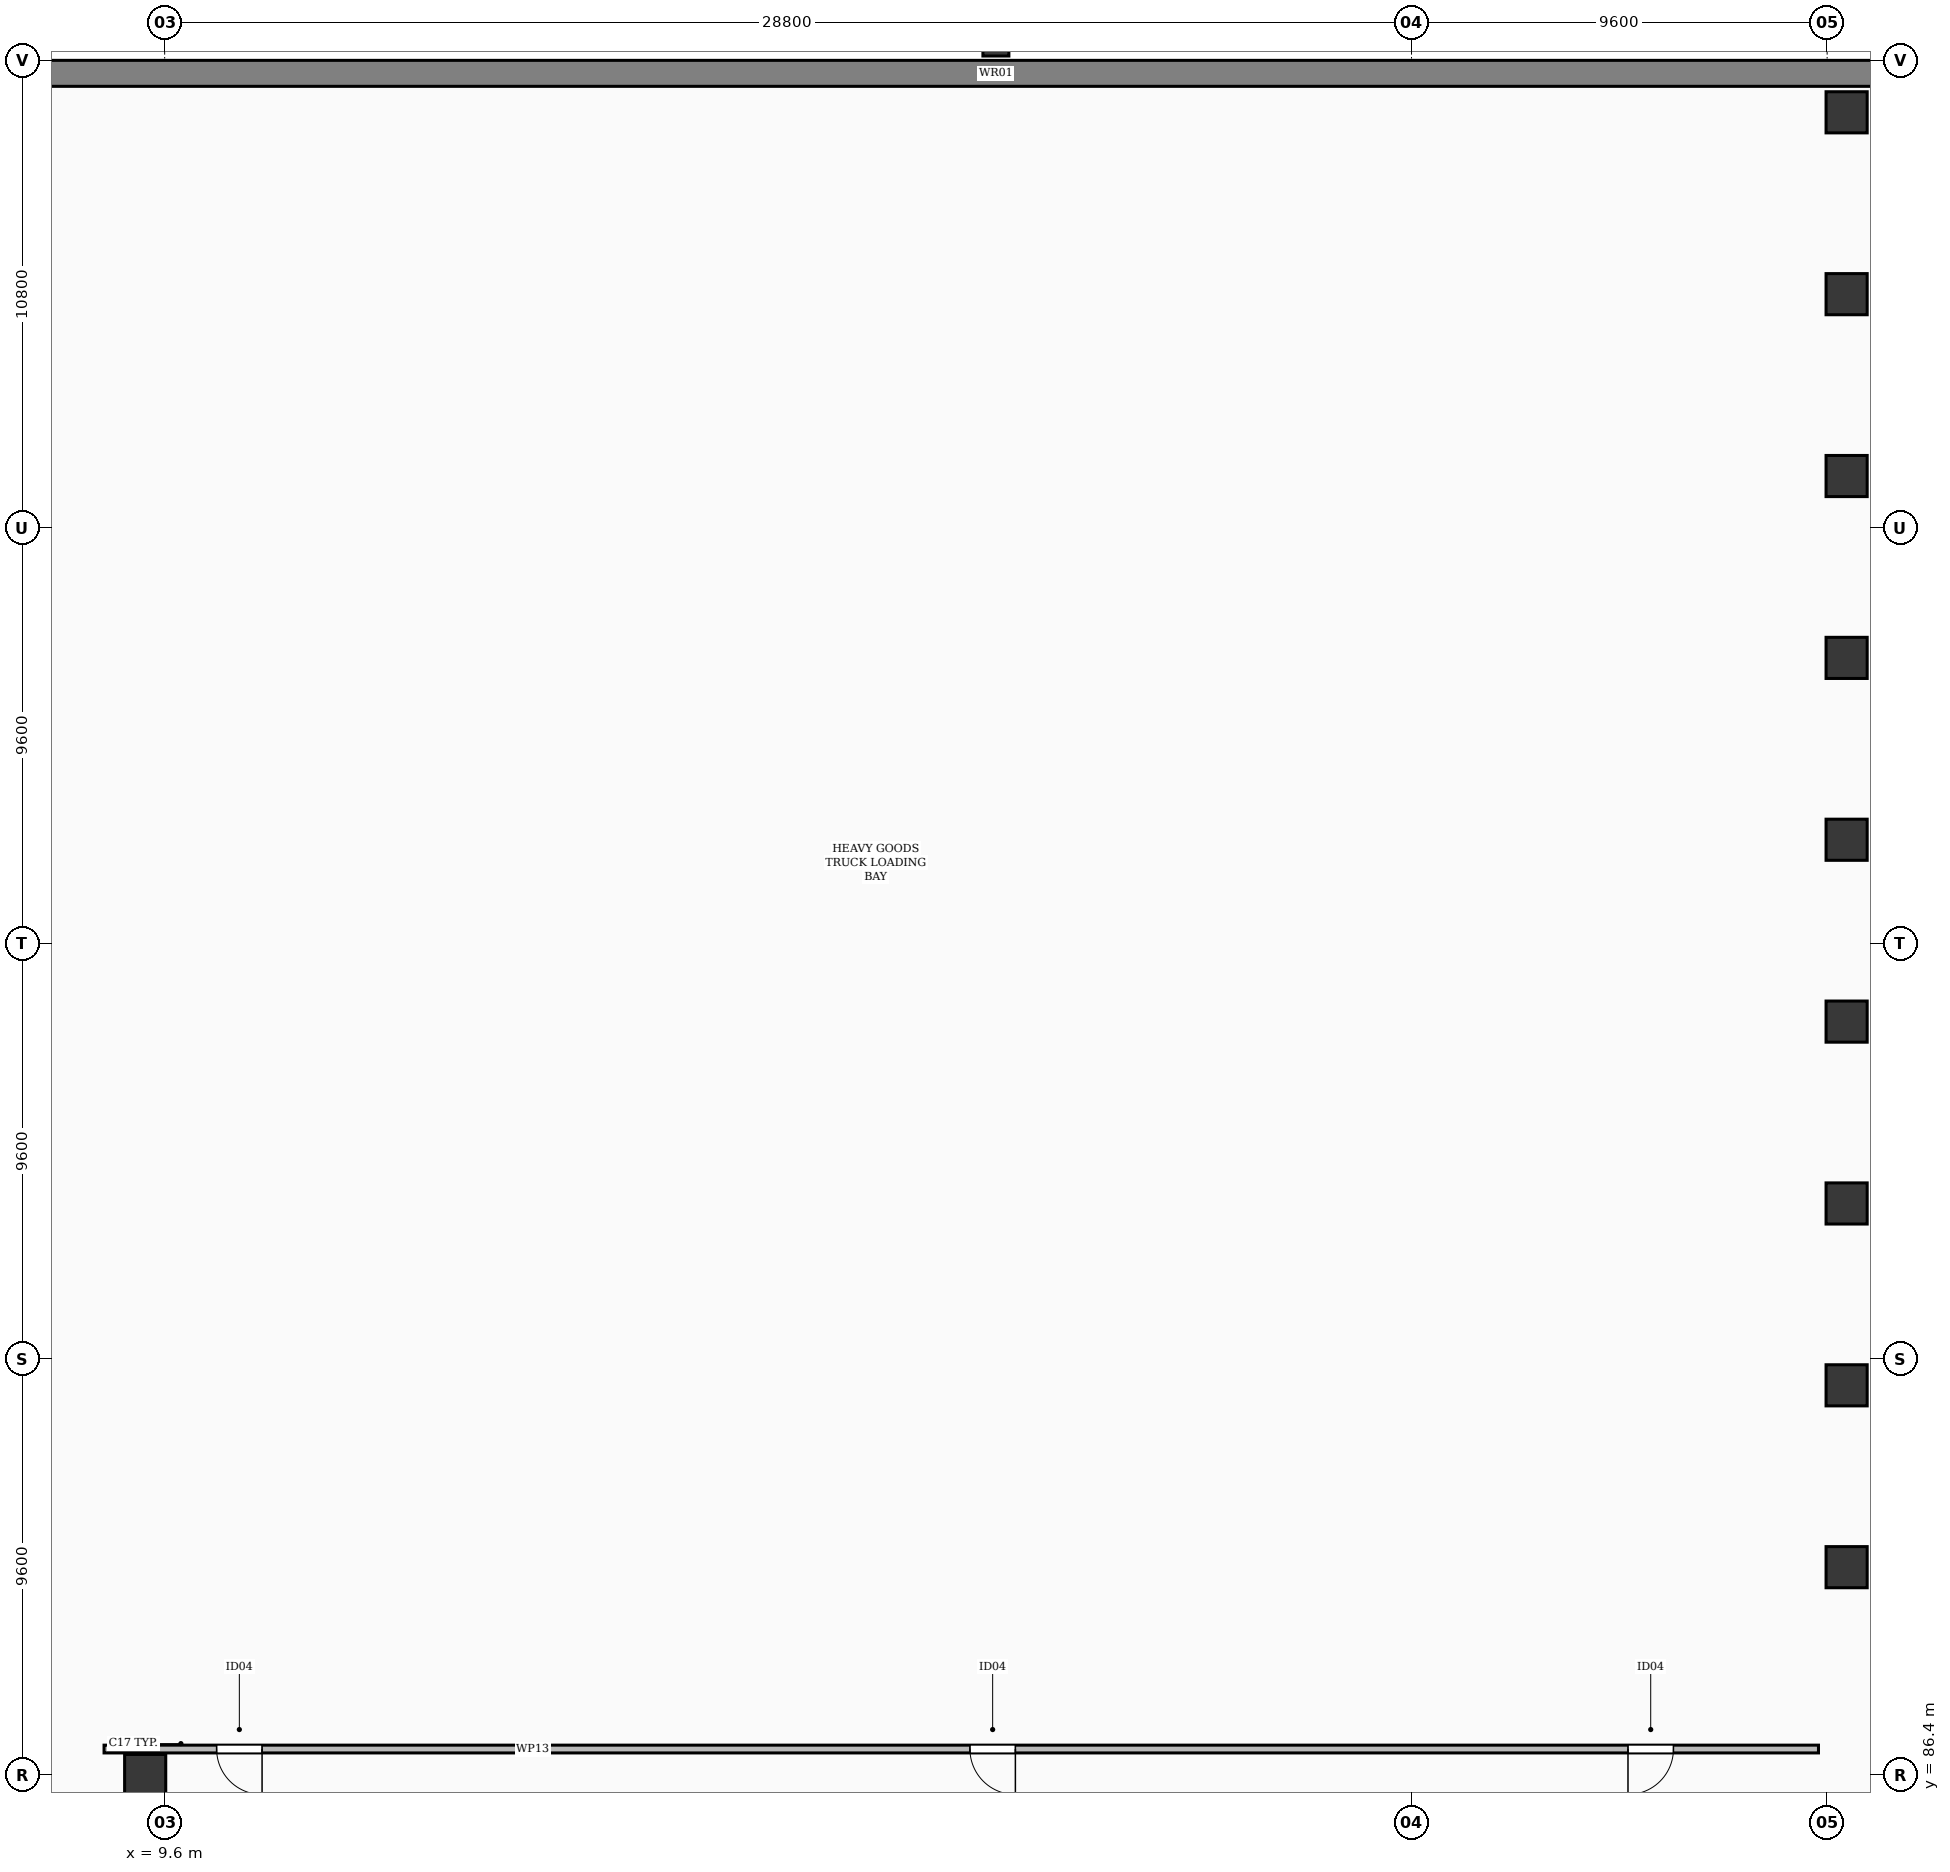
"""IFC4 building model, lengths in metres.
Left out: names, types, materials, properties, quantities, classifications, styles, units other than length and angle.
Written with IfcOpenShell. Run it as: python <this file> out.ifc"""

import sys

from ifc_helpers import new_model, si_unit, direction, frame, frame_2d, origin, origin_2d, place, context, subcontext, project, spatial, rectangle, extrude, element, fill, save


model = new_model("IFC4")
c1 = context("Model", 3, precision=1e-05, world=origin(), true_north=direction((0.0, 1.0)))
c2 = subcontext(c1, "Body", "Model", "MODEL_VIEW")
j1 = project(units=[si_unit("LENGTHUNIT", "METRE"), si_unit("PLANEANGLEUNIT", "RADIAN")], contexts=[c1])
p1 = place(None, origin())
s1 = spatial("IfcSite", under=j1, at=p1, CompositionType="ELEMENT")
p2 = place(p1, origin())
s2 = spatial("IfcBuilding", under=s1, at=p2, CompositionType="ELEMENT")
p3 = place(p2, frame((0.0, 0.0, -4.2)))
s3 = spatial("IfcBuildingStorey", under=s2, at=p3, CompositionType="ELEMENT", Elevation=-4.2)
for number, where, z_axis, x_axis in (
    (1, (9.15, 86.4, 0.0), (0.0, 0.0, 1.0), (1.0, 0.0, 0.0)),
    (2, (48.45, 91.2, 0.0), (0.0, 0.0, 1.0), (1.0, 0.0, 0.0)),
    (3, (48.45, 95.4, 0.0), (0.0, 0.0, 1.0), (1.0, 0.0, 0.0)),
    (4, (48.45, 99.6, 0.0), (0.0, 0.0, 1.0), (1.0, 0.0, 0.0)),
    (5, (48.45, 103.8, 0.0), (0.0, 0.0, 1.0), (1.0, 0.0, 0.0)),
    (6, (48.45, 108.0, 0.0), (0.0, 0.0, 1.0), (1.0, 0.0, 0.0)),
    (7, (48.45, 112.2, 0.0), (0.0, 0.0, 1.0), (1.0, 0.0, 0.0)),
    (8, (48.45, 116.4, 0.0), (0.0, 0.0, 1.0), (1.0, 0.0, 0.0)),
    (9, (48.45, 120.6, 0.0), (0.0, 0.0, 1.0), (1.0, 0.0, 0.0)),
    (10, (48.45, 124.8, 0.0), (0.0, 0.0, 1.0), (1.0, 0.0, 0.0)),
):
    element("IfcColumn", number, at=place(p3, frame(where, z_axis=z_axis, x_axis=x_axis)), inside=s3, PredefinedType="COLUMN", context=c2, shape_type="SweptSolid", body=[
        extrude(rectangle(XDim=0.95, YDim=0.95, at=origin_2d()), origin(), (0.0, 0.0, 1.0), 4.2),
    ])
p4 = place(p3, frame((28.8, 126.4, 0.0), z_axis=(0.0, 0.0, 1.0), x_axis=(1.0, 0.0, 0.0)))
e11 = element("IfcColumn", 11, at=p4, inside=s3, PredefinedType="COLUMN", context=c2, shape_type="SweptSolid", body=[
    extrude(rectangle(XDim=0.6, YDim=0.6, at=origin_2d()), origin(), (0.0, 0.0, 1.0), 4.2),
])
p5 = place(p3, frame((0.6, 125.7, 0.0), z_axis=(0.0, 0.0, 1.0), x_axis=(1.0, 0.0, 0.0)))
e12 = element("IfcWall", 12, at=p5, inside=s3, PredefinedType="USERDEFINED", context=c2, shape_type="SweptSolid", body=[
    extrude(rectangle(XDim=56.4, YDim=0.6, at=frame_2d((28.2, 0.0))), origin(), (0.0, 0.0, 1.0), 3.78),
])
p6 = place(p3, frame((8.2, 87.0, 0.0), z_axis=(0.0, 0.0, 1.0), x_axis=(1.0, 0.0, 0.0)))
e13 = element("IfcWall", 13, at=p6, inside=s3, PredefinedType="PARTITIONING", context=c2, shape_type="SweptSolid", body=[
    extrude(rectangle(XDim=39.6, YDim=0.18, at=frame_2d((19.8, 0.0))), origin(), (0.0, 0.0, 1.0), 3.78),
])
p7 = place(p6, frame((2.6, 0.0, 0.0)))
e14 = element("IfcOpeningElement", 14, at=p7, cuts=e13, PredefinedType="OPENING", context=c2, shape_type="SweptSolid", body=[
    extrude(rectangle(XDim=1.05, YDim=2.18, at=frame_2d((0.525, 1.09))), frame((0.0, 0.102, 0.0), z_axis=(0.0, -1.0, 0.0), x_axis=(1.0, 0.0, 0.0)), (0.0, 0.0, 1.0), 0.204),
])
p8 = place(p6, frame((35.2, 0.0, 0.0)))
e15 = element("IfcOpeningElement", 15, at=p8, cuts=e13, PredefinedType="OPENING", context=c2, shape_type="SweptSolid", body=[
    extrude(rectangle(XDim=1.05, YDim=2.18, at=frame_2d((0.525, 1.09))), frame((0.0, 0.102, 0.0), z_axis=(0.0, -1.0, 0.0), x_axis=(1.0, 0.0, 0.0)), (0.0, 0.0, 1.0), 0.204),
])
p9 = place(p6, frame((20.0, 0.0, 0.0)))
e16 = element("IfcOpeningElement", 16, at=p9, cuts=e13, PredefinedType="OPENING", context=c2, shape_type="SweptSolid", body=[
    extrude(rectangle(XDim=1.05, YDim=2.18, at=frame_2d((0.525, 1.09))), frame((0.0, 0.102, 0.0), z_axis=(0.0, -1.0, 0.0), x_axis=(1.0, 0.0, 0.0)), (0.0, 0.0, 1.0), 0.204),
])
p10 = place(p7, frame((1.05, 0.0, 0.0), z_axis=(0.0, 0.0, 1.0), x_axis=(-1.0, 0.0, 0.0)))
e17 = element("IfcDoor", 17, at=p10, inside=s3, OperationType="SINGLE_SWING_RIGHT", PredefinedType="DOOR", context=c2, shape_type="SweptSolid", body=[
    extrude(rectangle(XDim=1.05, YDim=2.18, at=frame_2d((0.525, 1.09))), frame((0.0, 0.025, 0.0), z_axis=(0.0, -1.0, 0.0), x_axis=(1.0, 0.0, 0.0)), (0.0, 0.0, 1.0), 0.05),
])
fill(e14, e17)
p11 = place(p8, frame((1.05, 0.0, 0.0), z_axis=(0.0, 0.0, 1.0), x_axis=(-1.0, 0.0, 0.0)))
e18 = element("IfcDoor", 18, at=p11, inside=s3, OperationType="SINGLE_SWING_LEFT", PredefinedType="DOOR", context=c2, shape_type="SweptSolid", body=[
    extrude(rectangle(XDim=1.05, YDim=2.18, at=frame_2d((0.525, 1.09))), frame((0.0, 0.025, 0.0), z_axis=(0.0, -1.0, 0.0), x_axis=(1.0, 0.0, 0.0)), (0.0, 0.0, 1.0), 0.05),
])
fill(e15, e18)
p12 = place(p9, frame((1.05, 0.0, 0.0), z_axis=(0.0, 0.0, 1.0), x_axis=(-1.0, 0.0, 0.0)))
e19 = element("IfcDoor", 19, at=p12, inside=s3, OperationType="SINGLE_SWING_RIGHT", PredefinedType="DOOR", context=c2, shape_type="SweptSolid", body=[
    extrude(rectangle(XDim=1.05, YDim=2.18, at=frame_2d((0.525, 1.09))), frame((0.0, 0.025, 0.0), z_axis=(0.0, -1.0, 0.0), x_axis=(1.0, 0.0, 0.0)), (0.0, 0.0, 1.0), 0.05),
])
fill(e16, e19)
save(model, sys.argv[1])
